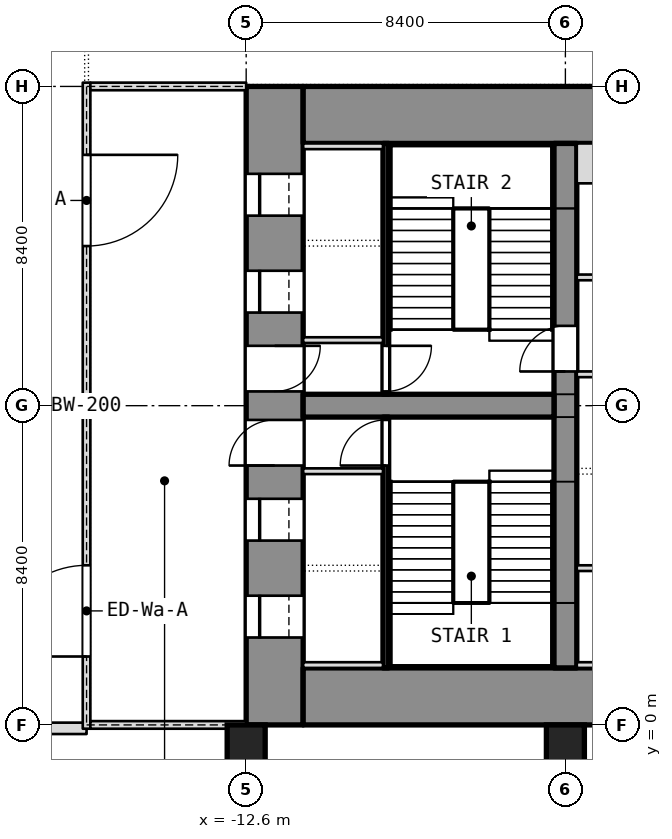
"""IFC4 building model, lengths in metres.
Left out: names, types, materials, properties, quantities, classifications, styles, units other than length and angle.
Written with IfcOpenShell. Run it as: python <this file> out.ifc"""

import sys

from ifc_helpers import new_model, si_unit, direction, frame, frame_2d, origin, origin_2d, place, context, subcontext, project, spatial, rectangle, extrude, element, fill, save


model = new_model("IFC4")
c1 = context("Model", 3, precision=1e-05, world=origin(), true_north=direction((0.0, 1.0)))
c2 = subcontext(c1, "Body", "Model", "MODEL_VIEW")
j1 = project(units=[si_unit("LENGTHUNIT", "METRE"), si_unit("PLANEANGLEUNIT", "RADIAN")], contexts=[c1])
p1 = place(None, origin())
s1 = spatial("IfcSite", under=j1, at=p1, CompositionType="ELEMENT")
p2 = place(p1, origin())
s2 = spatial("IfcBuilding", under=s1, at=p2, CompositionType="ELEMENT")
p3 = place(p2, frame((0.0, 0.0, 13.0)))
s3 = spatial("IfcBuildingStorey", under=s2, at=p3, CompositionType="ELEMENT", Elevation=13.0)
p4 = place(p3, frame((-11.85, 0.0, 0.0), z_axis=(0.0, 0.0, 1.0), x_axis=(0.0, 1.0, 0.0)))
e1 = element("IfcWall", 1, at=p4, inside=s3, PredefinedType="SHEAR", context=c2, shape_type="SweptSolid", body=[
    extrude(rectangle(XDim=16.8, YDim=1.5, at=frame_2d((8.4, 0.0))), origin(), (0.0, 0.0, 1.0), 8.0),
])
p5 = place(p4, frame((2.3, 0.0, 0.0)))
e2 = element("IfcOpeningElement", 2, at=p5, cuts=e1, PredefinedType="OPENING", context=c2, shape_type="SweptSolid", body=[
    extrude(rectangle(XDim=1.1, YDim=2.1, at=frame_2d((0.55, 1.05))), frame((0.0, 0.75, 0.0), z_axis=(0.0, -1.0, 0.0), x_axis=(1.0, 0.0, 0.0)), (0.0, 0.0, 1.0), 1.5),
])
p6 = place(p4, frame((4.85, 0.0, 0.0)))
e3 = element("IfcOpeningElement", 3, at=p6, cuts=e1, PredefinedType="OPENING", context=c2, shape_type="SweptSolid", body=[
    extrude(rectangle(XDim=1.1, YDim=2.1, at=frame_2d((0.55, 1.05))), frame((0.0, 0.75, 0.0), z_axis=(0.0, -1.0, 0.0), x_axis=(1.0, 0.0, 0.0)), (0.0, 0.0, 1.0), 1.5),
])
p7 = place(p4, frame((6.825, 0.0, 0.0)))
e4 = element("IfcOpeningElement", 4, at=p7, cuts=e1, PredefinedType="OPENING", context=c2, shape_type="SweptSolid", body=[
    extrude(rectangle(XDim=1.2, YDim=2.1, at=frame_2d((0.6, 1.05))), frame((0.0, 0.75, 0.0), z_axis=(0.0, -1.0, 0.0), x_axis=(1.0, 0.0, 0.0)), (0.0, 0.0, 1.0), 1.5),
])
p8 = place(p4, frame((13.4, 0.0, 0.0)))
e5 = element("IfcOpeningElement", 5, at=p8, cuts=e1, PredefinedType="OPENING", context=c2, shape_type="SweptSolid", body=[
    extrude(rectangle(XDim=1.1, YDim=2.1, at=frame_2d((0.55, 1.05))), frame((0.0, 0.75, 0.0), z_axis=(0.0, -1.0, 0.0), x_axis=(1.0, 0.0, 0.0)), (0.0, 0.0, 1.0), 1.5),
])
p9 = place(p4, frame((10.85, 0.0, 0.0)))
e6 = element("IfcOpeningElement", 6, at=p9, cuts=e1, PredefinedType="OPENING", context=c2, shape_type="SweptSolid", body=[
    extrude(rectangle(XDim=1.1, YDim=2.1, at=frame_2d((0.55, 1.05))), frame((0.0, 0.75, 0.0), z_axis=(0.0, -1.0, 0.0), x_axis=(1.0, 0.0, 0.0)), (0.0, 0.0, 1.0), 1.5),
])
p10 = place(p4, frame((8.775, 0.0, 0.0)))
e7 = element("IfcOpeningElement", 7, at=p10, cuts=e1, PredefinedType="OPENING", context=c2, shape_type="SweptSolid", body=[
    extrude(rectangle(XDim=1.2, YDim=2.1, at=frame_2d((0.6, 1.05))), frame((0.0, 0.75, 0.0), z_axis=(0.0, -1.0, 0.0), x_axis=(1.0, 0.0, 0.0)), (0.0, 0.0, 1.0), 1.5),
])
for number, where, z_axis, x_axis in (
    (8, (-11.1, 0.75, 0.0), (0.0, 0.0, 1.0), (1.0, 0.0, 0.0)),
    (9, (-11.1, 16.05, 0.0), (0.0, 0.0, 1.0), (1.0, 0.0, 0.0)),
):
    element("IfcWall", number, at=place(p3, frame(where, z_axis=z_axis, x_axis=x_axis)), inside=s3, PredefinedType="SHEAR", context=c2, shape_type="SweptSolid", body=[
        extrude(rectangle(XDim=22.2, YDim=1.5, at=frame_2d((11.1, 0.0))), origin(), (0.0, 0.0, 1.0), 8.0),
    ])
p11 = place(p3, frame((-4.2, 1.5, 0.0), z_axis=(0.0, 0.0, 1.0), x_axis=(0.0, 1.0, 0.0)))
e10 = element("IfcWall", 10, at=p11, inside=s3, PredefinedType="SHEAR", context=c2, shape_type="SweptSolid", body=[
    extrude(rectangle(XDim=13.8, YDim=0.6, at=frame_2d((6.9, 0.0))), origin(), (0.0, 0.0, 1.0), 8.0),
])
p12 = place(p11, frame((7.8, 0.0, 0.0)))
e11 = element("IfcOpeningElement", 11, at=p12, cuts=e10, PredefinedType="OPENING", context=c2, shape_type="SweptSolid", body=[
    extrude(rectangle(XDim=1.2, YDim=2.1, at=frame_2d((0.6, 1.05))), frame((0.0, 0.3, 0.0), z_axis=(0.0, -1.0, 0.0), x_axis=(1.0, 0.0, 0.0)), (0.0, 0.0, 1.0), 0.6),
])
p13 = place(p3, frame((-11.1, 8.4, 0.0), z_axis=(0.0, 0.0, 1.0), x_axis=(1.0, 0.0, 0.0)))
e12 = element("IfcWall", 12, at=p13, inside=s3, PredefinedType="SHEAR", context=c2, shape_type="SweptSolid", body=[
    extrude(rectangle(XDim=6.6, YDim=0.6, at=frame_2d((3.3, 0.0))), origin(), (0.0, 0.0, 1.0), 8.0),
])
for number, where, z_axis, x_axis in (
    (13, (-12.6, -0.5, 0.0), (0.0, 0.0, 1.0), (1.0, 0.0, 0.0)),
    (14, (-4.2, -0.5, 0.0), (0.0, 0.0, 1.0), (1.0, 0.0, 0.0)),
):
    element("IfcColumn", number, at=place(p3, frame(where, z_axis=z_axis, x_axis=x_axis)), inside=s3, PredefinedType="COLUMN", context=c2, shape_type="SweptSolid", body=[
        extrude(rectangle(XDim=1.0, YDim=1.0, at=origin_2d()), origin(), (0.0, 0.0, 1.0), 8.0),
    ])
p14 = place(p3, frame((-20.06, -0.09, 0.0), z_axis=(0.0, 0.0, 1.0), x_axis=(1.0, 0.0, 0.0)))
e15 = element("IfcWall", 15, at=p14, inside=s3, PredefinedType="NOTDEFINED", context=c2, shape_type="SweptSolid", body=[
    extrude(rectangle(XDim=3.26, YDim=0.3, at=frame_2d((1.63, 0.0))), origin(), (0.0, 0.0, 1.0), 8.0),
])
p15 = place(p3, frame((-8.925, 1.5, 0.0), z_axis=(0.0, 0.0, 1.0), x_axis=(0.0, 1.0, 0.0)))
e16 = element("IfcWall", 16, at=p15, inside=s3, PredefinedType="SHEAR", context=c2, shape_type="SweptSolid", body=[
    extrude(rectangle(XDim=6.6, YDim=0.15, at=frame_2d((3.3, 0.0))), origin(), (0.0, 0.0, 1.0), 7.78),
])
p16 = place(p15, frame((5.325, 0.0, 0.0)))
e17 = element("IfcOpeningElement", 17, at=p16, cuts=e16, PredefinedType="OPENING", context=c2, shape_type="SweptSolid", body=[
    extrude(rectangle(XDim=1.2, YDim=2.1, at=frame_2d((0.6, 1.05))), frame((0.0, 0.075, 0.0), z_axis=(0.0, -1.0, 0.0), x_axis=(1.0, 0.0, 0.0)), (0.0, 0.0, 1.0), 0.15),
])
for number, where, z_axis, x_axis in (
    (18, (-11.1, 6.675, 0.0), (0.0, 0.0, 1.0), (1.0, 0.0, 0.0)),
    (19, (-11.1, 1.575, 0.0), (0.0, 0.0, 1.0), (1.0, 0.0, 0.0)),
):
    element("IfcWall", number, at=place(p3, frame(where, z_axis=z_axis, x_axis=x_axis)), inside=s3, PredefinedType="SHEAR", context=c2, shape_type="SweptSolid", body=[
        extrude(rectangle(XDim=2.1, YDim=0.15, at=frame_2d((1.05, 0.0))), origin(), (0.0, 0.0, 1.0), 8.0),
    ])
p17 = place(p3, frame((-8.925, 8.7, 0.0), z_axis=(0.0, 0.0, 1.0), x_axis=(0.0, 1.0, 0.0)))
e20 = element("IfcWall", 20, at=p17, inside=s3, PredefinedType="SHEAR", context=c2, shape_type="SweptSolid", body=[
    extrude(rectangle(XDim=6.6, YDim=0.15, at=frame_2d((3.3, 0.0))), origin(), (0.0, 0.0, 1.0), 7.78),
])
p18 = place(p17, frame((0.075, 0.0, 0.0)))
e21 = element("IfcOpeningElement", 21, at=p18, cuts=e20, PredefinedType="OPENING", context=c2, shape_type="SweptSolid", body=[
    extrude(rectangle(XDim=1.2, YDim=2.1, at=frame_2d((0.6, 1.05))), frame((0.0, 0.075, 0.0), z_axis=(0.0, -1.0, 0.0), x_axis=(1.0, 0.0, 0.0)), (0.0, 0.0, 1.0), 0.15),
])
for number, where, z_axis, x_axis in (
    (22, (-11.1, 10.125, 0.0), (0.0, 0.0, 1.0), (1.0, 0.0, 0.0)),
    (23, (-11.1, 15.225, 0.0), (0.0, 0.0, 1.0), (1.0, 0.0, 0.0)),
):
    element("IfcWall", number, at=place(p3, frame(where, z_axis=z_axis, x_axis=x_axis)), inside=s3, PredefinedType="SHEAR", context=c2, shape_type="SweptSolid", body=[
        extrude(rectangle(XDim=2.1, YDim=0.15, at=frame_2d((1.05, 0.0))), origin(), (0.0, 0.0, 1.0), 8.0),
    ])
p19 = place(p3, frame((-3.9, 4.125, 0.0), z_axis=(0.0, 0.0, 1.0), x_axis=(1.0, 0.0, 0.0)))
e24 = element("IfcWall", 24, at=p19, inside=s3, PredefinedType="PARTITIONING", context=c2, shape_type="SweptSolid", body=[
    extrude(rectangle(XDim=7.8, YDim=0.15, at=frame_2d((3.9, 0.0))), origin(), (0.0, 0.0, 1.0), 7.78),
])
p20 = place(p19, frame((3.75, 0.0, 0.0)))
e25 = element("IfcOpeningElement", 25, at=p20, cuts=e24, PredefinedType="OPENING", context=c2, shape_type="SweptSolid", body=[
    extrude(rectangle(XDim=1.2, YDim=2.1, at=frame_2d((0.6, 1.05))), frame((0.0, 0.075, 0.0), z_axis=(0.0, -1.0, 0.0), x_axis=(1.0, 0.0, 0.0)), (0.0, 0.0, 1.0), 0.15),
])
p21 = place(p3, frame((-3.9, 11.775, 0.0), z_axis=(0.0, 0.0, 1.0), x_axis=(1.0, 0.0, 0.0)))
e26 = element("IfcWall", 26, at=p21, inside=s3, PredefinedType="PARTITIONING", context=c2, shape_type="SweptSolid", body=[
    extrude(rectangle(XDim=7.8, YDim=0.15, at=frame_2d((3.9, 0.0))), origin(), (0.0, 0.0, 1.0), 7.78),
])
p22 = place(p21, frame((3.3, 0.0, 0.0)))
e27 = element("IfcOpeningElement", 27, at=p22, cuts=e26, PredefinedType="OPENING", context=c2, shape_type="SweptSolid", body=[
    extrude(rectangle(XDim=1.2, YDim=2.1, at=frame_2d((0.6, 1.05))), frame((0.0, 0.075, 0.0), z_axis=(0.0, -1.0, 0.0), x_axis=(1.0, 0.0, 0.0)), (0.0, 0.0, 1.0), 0.15),
])
p23 = place(p3, frame((-3.9, 1.575, 0.0), z_axis=(0.0, 0.0, 1.0), x_axis=(1.0, 0.0, 0.0)))
e28 = element("IfcWall", 28, at=p23, inside=s3, PredefinedType="SHEAR", context=c2, shape_type="SweptSolid", body=[
    extrude(rectangle(XDim=3.0, YDim=0.15, at=frame_2d((1.5, 0.0))), origin(), (0.0, 0.0, 1.0), 8.0),
])
p24 = place(p3, frame((-3.9, 9.225, 0.0), z_axis=(0.0, 0.0, 1.0), x_axis=(1.0, 0.0, 0.0)))
e29 = element("IfcWall", 29, at=p24, inside=s3, PredefinedType="SHEAR", context=c2, shape_type="SweptSolid", body=[
    extrude(rectangle(XDim=2.25, YDim=0.15, at=frame_2d((1.125, 0.0))), origin(), (0.0, 0.0, 1.0), 8.0),
])
p25 = place(p3, frame((-3.9, 14.775, 0.0), z_axis=(0.0, 0.0, 1.0), x_axis=(1.0, 0.0, 0.0)))
e30 = element("IfcWall", 30, at=p25, inside=s3, PredefinedType="PARTITIONING", context=c2, shape_type="SweptSolid", body=[
    extrude(rectangle(XDim=2.25, YDim=1.05, at=frame_2d((1.125, 0.0))), origin(), (0.0, 0.0, 1.0), 7.78),
])
p26 = place(p3, frame((-16.8, -0.1, 0.0), z_axis=(0.0, 0.0, 1.0), x_axis=(0.0, 1.0, 0.0)))
e31 = element("IfcWall", 31, at=p26, inside=s3, PredefinedType="PARTITIONING", context=c2, shape_type="SweptSolid", body=[
    extrude(rectangle(XDim=17.0, YDim=0.2, at=frame_2d((8.5, 0.0))), origin(), (0.0, 0.0, 1.0), 7.78),
])
p27 = place(p26, frame((1.9, 0.0, 0.0)))
e32 = element("IfcOpeningElement", 32, at=p27, cuts=e31, PredefinedType="OPENING", context=c2, shape_type="SweptSolid", body=[
    extrude(rectangle(XDim=2.4, YDim=2.1, at=frame_2d((1.2, 1.05))), frame((0.0, 0.1, 0.0), z_axis=(0.0, -1.0, 0.0), x_axis=(1.0, 0.0, 0.0)), (0.0, 0.0, 1.0), 0.2),
])
p28 = place(p26, frame((12.7, 0.0, 0.0)))
e33 = element("IfcOpeningElement", 33, at=p28, cuts=e31, PredefinedType="OPENING", context=c2, shape_type="SweptSolid", body=[
    extrude(rectangle(XDim=2.4, YDim=2.1, at=frame_2d((1.2, 1.05))), frame((0.0, 0.1, 0.0), z_axis=(0.0, -1.0, 0.0), x_axis=(1.0, 0.0, 0.0)), (0.0, 0.0, 1.0), 0.2),
])
for number, where, z_axis, x_axis in (
    (34, (-16.7, 0.0, 0.0), (0.0, 0.0, 1.0), (1.0, 0.0, 0.0)),
    (35, (-16.7, 16.8, 0.0), (0.0, 0.0, 1.0), (1.0, 0.0, 0.0)),
):
    element("IfcWall", number, at=place(p3, frame(where, z_axis=z_axis, x_axis=x_axis)), inside=s3, PredefinedType="PARTITIONING", context=c2, shape_type="SweptSolid", body=[
        extrude(rectangle(XDim=4.1, YDim=0.2, at=frame_2d((2.05, 0.0))), origin(), (0.0, 0.0, 1.0), 7.78),
    ])
p29 = place(p5, origin())
e36 = element("IfcDoor", 36, at=p29, inside=s3, OperationType="SLIDING_TO_LEFT", PredefinedType="DOOR", context=c2, shape_type="SweptSolid", body=[
    extrude(rectangle(XDim=1.1, YDim=2.1, at=frame_2d((0.55, 1.05))), frame((0.0, 0.025, 0.0), z_axis=(0.0, -1.0, 0.0), x_axis=(1.0, 0.0, 0.0)), (0.0, 0.0, 1.0), 0.05),
])
fill(e2, e36)
p30 = place(p6, origin())
e37 = element("IfcDoor", 37, at=p30, inside=s3, OperationType="SLIDING_TO_LEFT", PredefinedType="DOOR", context=c2, shape_type="SweptSolid", body=[
    extrude(rectangle(XDim=1.1, YDim=2.1, at=frame_2d((0.55, 1.05))), frame((0.0, 0.025, 0.0), z_axis=(0.0, -1.0, 0.0), x_axis=(1.0, 0.0, 0.0)), (0.0, 0.0, 1.0), 0.05),
])
fill(e3, e37)
p31 = place(p7, origin())
e38 = element("IfcDoor", 38, at=p31, inside=s3, OperationType="SINGLE_SWING_LEFT", PredefinedType="DOOR", context=c2, shape_type="SweptSolid", body=[
    extrude(rectangle(XDim=1.2, YDim=2.1, at=frame_2d((0.6, 1.05))), frame((0.0, 0.025, 0.0), z_axis=(0.0, -1.0, 0.0), x_axis=(1.0, 0.0, 0.0)), (0.0, 0.0, 1.0), 0.05),
])
fill(e4, e38)
p32 = place(p16, origin())
e39 = element("IfcDoor", 39, at=p32, inside=s3, OperationType="SINGLE_SWING_LEFT", PredefinedType="DOOR", context=c2, shape_type="SweptSolid", body=[
    extrude(rectangle(XDim=1.2, YDim=2.1, at=frame_2d((0.6, 1.05))), frame((0.0, 0.025, 0.0), z_axis=(0.0, -1.0, 0.0), x_axis=(1.0, 0.0, 0.0)), (0.0, 0.0, 1.0), 0.05),
])
fill(e17, e39)
p33 = place(p8, origin())
e40 = element("IfcDoor", 40, at=p33, inside=s3, OperationType="SLIDING_TO_LEFT", PredefinedType="DOOR", context=c2, shape_type="SweptSolid", body=[
    extrude(rectangle(XDim=1.1, YDim=2.1, at=frame_2d((0.55, 1.05))), frame((0.0, 0.025, 0.0), z_axis=(0.0, -1.0, 0.0), x_axis=(1.0, 0.0, 0.0)), (0.0, 0.0, 1.0), 0.05),
])
fill(e5, e40)
p34 = place(p9, origin())
e41 = element("IfcDoor", 41, at=p34, inside=s3, OperationType="SLIDING_TO_LEFT", PredefinedType="DOOR", context=c2, shape_type="SweptSolid", body=[
    extrude(rectangle(XDim=1.1, YDim=2.1, at=frame_2d((0.55, 1.05))), frame((0.0, 0.025, 0.0), z_axis=(0.0, -1.0, 0.0), x_axis=(1.0, 0.0, 0.0)), (0.0, 0.0, 1.0), 0.05),
])
fill(e6, e41)
p35 = place(p10, origin())
e42 = element("IfcDoor", 42, at=p35, inside=s3, OperationType="SINGLE_SWING_LEFT", PredefinedType="DOOR", context=c2, shape_type="SweptSolid", body=[
    extrude(rectangle(XDim=1.2, YDim=2.1, at=frame_2d((0.6, 1.05))), frame((0.0, 0.025, 0.0), z_axis=(0.0, -1.0, 0.0), x_axis=(1.0, 0.0, 0.0)), (0.0, 0.0, 1.0), 0.05),
])
fill(e7, e42)
p36 = place(p18, origin())
e43 = element("IfcDoor", 43, at=p36, inside=s3, OperationType="SINGLE_SWING_LEFT", PredefinedType="DOOR", context=c2, shape_type="SweptSolid", body=[
    extrude(rectangle(XDim=1.2, YDim=2.1, at=frame_2d((0.6, 1.05))), frame((0.0, 0.025, 0.0), z_axis=(0.0, -1.0, 0.0), x_axis=(1.0, 0.0, 0.0)), (0.0, 0.0, 1.0), 0.05),
])
fill(e21, e43)
p37 = place(p12, origin())
e44 = element("IfcDoor", 44, at=p37, inside=s3, OperationType="SINGLE_SWING_LEFT", PredefinedType="DOOR", context=c2, shape_type="SweptSolid", body=[
    extrude(rectangle(XDim=1.2, YDim=2.1, at=frame_2d((0.6, 1.05))), frame((0.0, 0.025, 0.0), z_axis=(0.0, -1.0, 0.0), x_axis=(1.0, 0.0, 0.0)), (0.0, 0.0, 1.0), 0.05),
])
fill(e11, e44)
p38 = place(p27, origin())
e45 = element("IfcDoor", 45, at=p38, inside=s3, OperationType="DOUBLE_DOOR_SINGLE_SWING", PredefinedType="DOOR", context=c2, shape_type="SweptSolid", body=[
    extrude(rectangle(XDim=2.4, YDim=2.1, at=frame_2d((1.2, 1.05))), frame((0.0, 0.025, 0.0), z_axis=(0.0, -1.0, 0.0), x_axis=(1.0, 0.0, 0.0)), (0.0, 0.0, 1.0), 0.05),
])
fill(e32, e45)
p39 = place(p28, origin())
e46 = element("IfcDoor", 46, at=p39, inside=s3, OperationType="DOUBLE_DOOR_SINGLE_SWING", PredefinedType="DOOR", context=c2, shape_type="SweptSolid", body=[
    extrude(rectangle(XDim=2.4, YDim=2.1, at=frame_2d((1.2, 1.05))), frame((0.0, 0.025, 0.0), z_axis=(0.0, -1.0, 0.0), x_axis=(1.0, 0.0, 0.0)), (0.0, 0.0, 1.0), 0.05),
])
fill(e33, e46)
save(model, sys.argv[1])
